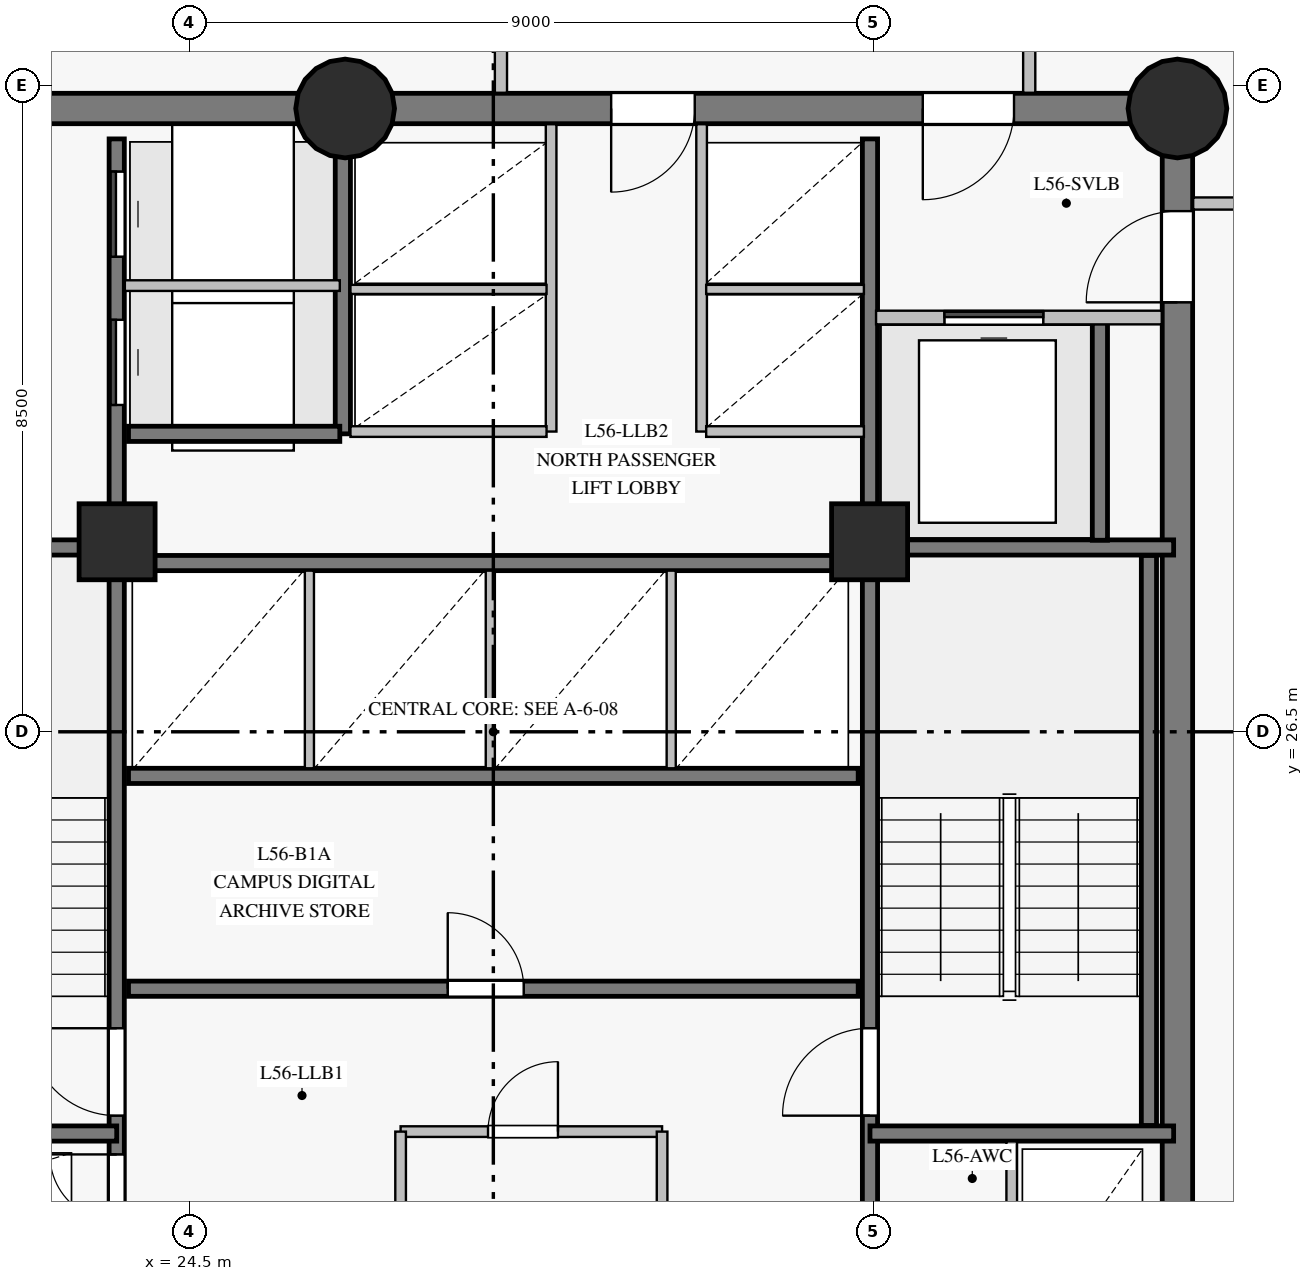
"""IFC4 building model, lengths in metres.
Left out: names, types, materials, properties, quantities, classifications, styles, units other than length and angle.
Written with IfcOpenShell. Run it as: python <this file> out.ifc"""

import sys

from ifc_helpers import new_model, si_unit, direction, frame, frame_2d, origin, origin_with_axes, origin_2d, place, context, subcontext, project, spatial, rectangle, circle, extrude, source, transform, mapped, element, fill, save


model = new_model("IFC4")
c1 = context("Model", 3, precision=1e-05, world=origin(), true_north=direction((0.0, 1.0)))
c2 = subcontext(c1, "Body", "Model", "MODEL_VIEW")
j1 = project(units=[si_unit("LENGTHUNIT", "METRE"), si_unit("PLANEANGLEUNIT", "RADIAN")], contexts=[c1])
p1 = place(None, origin())
s1 = spatial("IfcSite", under=j1, at=p1, CompositionType="ELEMENT")
p2 = place(p1, origin())
s2 = spatial("IfcBuilding", under=s1, at=p2, CompositionType="ELEMENT")
p3 = place(p2, frame((0.0, 0.0, 193.15)))
s3 = spatial("IfcBuildingStorey", under=s2, at=p3, CompositionType="ELEMENT", Elevation=193.15)
p4 = place(p3, frame((37.5, 18.3, 0.0), z_axis=(0.0, 0.0, 1.0), x_axis=(0.0, 1.0, 0.0)))
e1 = element("IfcWall", 1, at=p4, inside=s3, PredefinedType="SHEAR", context=c2, shape_type="SweptSolid", body=[
    extrude(rectangle(XDim=16.4, YDim=0.4, at=frame_2d((8.2, 0.0))), origin(), (0.0, 0.0, 1.0), 2.825),
])
p5 = place(p4, frame((13.85, 0.0, 0.0)))
e2 = element("IfcOpeningElement", 2, at=p5, cuts=e1, PredefinedType="OPENING", context=c2, shape_type="SweptSolid", body=[
    extrude(rectangle(XDim=1.2, YDim=2.15, at=frame_2d((0.6, 1.075))), frame((0.0, 0.21, 0.0), z_axis=(0.0, -1.0, 0.0), x_axis=(1.0, 0.0, 0.0)), (0.0, 0.0, 1.0), 0.42),
])
p6 = place(p3, frame((37.5, 34.7, 0.0), z_axis=(0.0, 0.0, 1.0), x_axis=(-1.0, 0.0, 0.0)))
e3 = element("IfcWall", 3, at=p6, inside=s3, PredefinedType="SHEAR", context=c2, shape_type="SweptSolid", body=[
    extrude(rectangle(XDim=10.95, YDim=0.4, at=frame_2d((5.475, 0.0))), origin(), (0.0, 0.0, 1.0), 2.825),
])
p7 = place(p6, frame((2.15, 0.0, 0.0)))
e4 = element("IfcOpeningElement", 4, at=p7, cuts=e3, PredefinedType="OPENING", context=c2, shape_type="SweptSolid", body=[
    extrude(rectangle(XDim=1.2, YDim=2.15, at=frame_2d((0.6, 1.075))), frame((0.0, 0.21, 0.0), z_axis=(0.0, -1.0, 0.0), x_axis=(1.0, 0.0, 0.0)), (0.0, 0.0, 1.0), 0.42),
])
p8 = place(p6, frame((6.35, 0.0, 0.0)))
e5 = element("IfcOpeningElement", 5, at=p8, cuts=e3, PredefinedType="OPENING", context=c2, shape_type="SweptSolid", body=[
    extrude(rectangle(XDim=1.1, YDim=2.15, at=frame_2d((0.55, 1.075))), frame((0.0, 0.21, 0.0), z_axis=(0.0, -1.0, 0.0), x_axis=(1.0, 0.0, 0.0)), (0.0, 0.0, 1.0), 0.42),
])
p9 = place(p3, frame((26.55, 34.7, 0.0), z_axis=(0.0, 0.0, 1.0), x_axis=(-1.0, 0.0, 0.0)))
e6 = element("IfcWall", 6, at=p9, inside=s3, PredefinedType="SHEAR", context=c2, shape_type="SweptSolid", body=[
    extrude(rectangle(XDim=7.05, YDim=0.4, at=frame_2d((3.525, 0.0))), origin(), (0.0, 0.0, 1.0), 2.825),
])
m1 = source(origin_with_axes(), c2, "Body", "SweptSolid", [
    extrude(circle(Radius=0.65, at=origin_2d()), origin(), (0.0, 0.0, 1.0), 3.05),
])
for number, where, z_axis, x_axis in (
    (7, (26.55, 34.7, 0.0), (0.0, 0.0, 1.0), (1.0, 0.0, 0.0)),
    (8, (37.5, 34.7, 0.0), (0.0, 0.0, 1.0), (1.0, 0.0, 0.0)),
):
    element("IfcColumn", number, at=place(p3, frame(where, z_axis=z_axis, x_axis=x_axis)), inside=s3, PredefinedType="COLUMN", context=c2, shape_type="MappedRepresentation", body=[
        mapped(m1, transform((0.0, 0.0, 0.0), scale=1.0)),
    ])
m2 = source(origin_with_axes(), c2, "Body", "SweptSolid", [
    extrude(rectangle(XDim=1.0, YDim=1.0, at=origin_2d()), origin(), (0.0, 0.0, 1.0), 3.05),
])
for number, where, z_axis, x_axis in (
    (9, (23.55, 29.0, 0.0), (0.0, 0.0, 1.0), (1.0, 0.0, 0.0)),
    (10, (33.45, 29.0, 0.0), (0.0, 0.0, 1.0), (1.0, 0.0, 0.0)),
):
    element("IfcColumn", number, at=place(p3, frame(where, z_axis=z_axis, x_axis=x_axis)), inside=s3, PredefinedType="COLUMN", context=c2, shape_type="MappedRepresentation", body=[
        mapped(m2, transform((0.0, 0.0, 0.0), scale=1.0)),
    ])
p10 = place(p3, frame((23.545, 18.7, 0.0), z_axis=(0.0, 0.0, 1.0), x_axis=(0.0, 1.0, 0.0)))
e11 = element("IfcWall", 11, at=p10, inside=s3, PredefinedType="SHEAR", context=c2, shape_type="SweptSolid", body=[
    extrude(rectangle(XDim=15.6, YDim=0.2, at=frame_2d((7.8, 0.0))), origin(), (0.0, 0.0, 1.0), 2.825),
])
p11 = place(p10, frame((2.75, 0.0, 0.0)))
e12 = element("IfcOpeningElement", 12, at=p11, cuts=e11, PredefinedType="OPENING", context=c2, shape_type="SweptSolid", body=[
    extrude(rectangle(XDim=1.15, YDim=2.15, at=frame_2d((0.575, 1.075))), frame((0.0, 0.11, 0.0), z_axis=(0.0, -1.0, 0.0), x_axis=(1.0, 0.0, 0.0)), (0.0, 0.0, 1.0), 0.22),
])
p12 = place(p10, frame((0.14, 0.0, 0.0)))
e13 = element("IfcOpeningElement", 13, at=p12, cuts=e11, PredefinedType="OPENING", context=c2, shape_type="SweptSolid", body=[
    extrude(rectangle(XDim=0.88, YDim=2.1, at=frame_2d((0.44, 1.05))), frame((0.0, 0.11, 0.0), z_axis=(0.0, -1.0, 0.0), x_axis=(1.0, 0.0, 0.0)), (0.0, 0.0, 1.0), 0.22),
])
p13 = place(p10, frame((1.36, 0.0, 0.0)))
e14 = element("IfcOpeningElement", 14, at=p13, cuts=e11, PredefinedType="OPENING", context=c2, shape_type="SweptSolid", body=[
    extrude(rectangle(XDim=0.88, YDim=2.1, at=frame_2d((0.44, 1.05))), frame((0.0, 0.11, 0.0), z_axis=(0.0, -1.0, 0.0), x_axis=(1.0, 0.0, 0.0)), (0.0, 0.0, 1.0), 0.22),
])
p14 = place(p10, frame((12.1, 0.0, 0.0)))
e15 = element("IfcOpeningElement", 15, at=p14, cuts=e11, PredefinedType="OPENING", context=c2, shape_type="SweptSolid", body=[
    extrude(rectangle(XDim=1.12, YDim=2.15, at=frame_2d((0.56, 1.075))), frame((0.0, 0.11, 0.0), z_axis=(0.0, -1.0, 0.0), x_axis=(1.0, 0.0, 0.0)), (0.0, 0.0, 1.0), 0.22),
])
p15 = place(p10, frame((14.05, 0.0, 0.0)))
e16 = element("IfcOpeningElement", 16, at=p15, cuts=e11, PredefinedType="OPENING", context=c2, shape_type="SweptSolid", body=[
    extrude(rectangle(XDim=1.12, YDim=2.15, at=frame_2d((0.56, 1.075))), frame((0.0, 0.11, 0.0), z_axis=(0.0, -1.0, 0.0), x_axis=(1.0, 0.0, 0.0)), (0.0, 0.0, 1.0), 0.22),
])
p16 = place(p3, frame((33.455, 18.7, 0.0), z_axis=(0.0, 0.0, 1.0), x_axis=(0.0, 1.0, 0.0)))
e17 = element("IfcWall", 17, at=p16, inside=s3, PredefinedType="SHEAR", context=c2, shape_type="SweptSolid", body=[
    extrude(rectangle(XDim=15.6, YDim=0.2, at=frame_2d((7.8, 0.0))), origin(), (0.0, 0.0, 1.0), 2.825),
])
p17 = place(p16, frame((2.75, 0.0, 0.0)))
e18 = element("IfcOpeningElement", 18, at=p17, cuts=e17, PredefinedType="OPENING", context=c2, shape_type="SweptSolid", body=[
    extrude(rectangle(XDim=1.15, YDim=2.15, at=frame_2d((0.575, 1.075))), frame((0.0, 0.11, 0.0), z_axis=(0.0, -1.0, 0.0), x_axis=(1.0, 0.0, 0.0)), (0.0, 0.0, 1.0), 0.22),
])
p18 = place(p16, frame((0.55, 0.0, 0.0)))
e19 = element("IfcOpeningElement", 19, at=p18, cuts=e17, PredefinedType="OPENING", context=c2, shape_type="SweptSolid", body=[
    extrude(rectangle(XDim=0.94, YDim=2.1, at=frame_2d((0.47, 1.05))), frame((0.0, 0.11, 0.0), z_axis=(0.0, -1.0, 0.0), x_axis=(1.0, 0.0, 0.0)), (0.0, 0.0, 1.0), 0.22),
])
p19 = place(p3, frame((23.7, 23.12, 0.0), z_axis=(0.0, 0.0, 1.0), x_axis=(1.0, 0.0, 0.0)))
e20 = element("IfcWall", 20, at=p19, inside=s3, PredefinedType="SHEAR", context=c2, shape_type="SweptSolid", body=[
    extrude(rectangle(XDim=9.6, YDim=0.2, at=frame_2d((4.8, 0.0))), origin(), (0.0, 0.0, 1.0), 2.825),
])
p20 = place(p19, frame((4.2, 0.0, 0.0)))
e21 = element("IfcOpeningElement", 21, at=p20, cuts=e20, PredefinedType="OPENING", context=c2, shape_type="SweptSolid", body=[
    extrude(rectangle(XDim=1.0, YDim=2.15, at=frame_2d((0.5, 1.075))), frame((0.0, 0.11, 0.0), z_axis=(0.0, -1.0, 0.0), x_axis=(1.0, 0.0, 0.0)), (0.0, 0.0, 1.0), 0.22),
])
for number, where, z_axis, x_axis in (
    (22, (23.7, 25.92, 0.0), (0.0, 0.0, 1.0), (1.0, 0.0, 0.0)),
    (23, (23.7, 28.72, 0.0), (0.0, 0.0, 1.0), (1.0, 0.0, 0.0)),
):
    element("IfcWall", number, at=place(p3, frame(where, z_axis=z_axis, x_axis=x_axis)), inside=s3, PredefinedType="SHEAR", context=c2, shape_type="SweptSolid", body=[
        extrude(rectangle(XDim=9.6, YDim=0.2, at=frame_2d((4.8, 0.0))), origin(), (0.0, 0.0, 1.0), 2.825),
    ])
p21 = place(p3, frame((37.125, 21.32, 0.0), z_axis=(0.0, 0.0, 1.0), x_axis=(0.0, 1.0, 0.0)))
e24 = element("IfcWall", 24, at=p21, inside=s3, PredefinedType="SHEAR", context=c2, shape_type="SweptSolid", body=[
    extrude(rectangle(XDim=7.5, YDim=0.2, at=frame_2d((3.75, 0.0))), origin(), (0.0, 0.0, 1.0), 2.825),
])
for number, where, z_axis, x_axis in (
    (25, (33.455, 21.215, 0.0), (0.0, 0.0, 1.0), (1.0, 0.0, 0.0)),
    (26, (33.455, 28.925, 0.0), (0.0, 0.0, 1.0), (1.0, 0.0, 0.0)),
    (27, (19.55, 21.215, 0.0), (0.0, 0.0, 1.0), (1.0, 0.0, 0.0)),
    (28, (19.55, 28.925, 0.0), (0.0, 0.0, 1.0), (1.0, 0.0, 0.0)),
):
    element("IfcWall", number, at=place(p3, frame(where, z_axis=z_axis, x_axis=x_axis)), inside=s3, PredefinedType="SHEAR", context=c2, shape_type="SweptSolid", body=[
        extrude(rectangle(XDim=3.995, YDim=0.2, at=frame_2d((1.998, 0.0))), origin(), (0.0, 0.0, 1.0), 2.825),
    ])
p22 = place(p3, frame((26.52, 30.42, 0.0), z_axis=(0.0, 0.0, 1.0), x_axis=(0.0, 1.0, 0.0)))
e29 = element("IfcWall", 29, at=p22, inside=s3, PredefinedType="SHEAR", context=c2, shape_type="SweptSolid", body=[
    extrude(rectangle(XDim=3.86, YDim=0.2, at=frame_2d((1.93, 0.0))), origin(), (0.0, 0.0, 1.0), 2.825),
])
p23 = place(p3, frame((36.48, 29.02, 0.0), z_axis=(0.0, 0.0, 1.0), x_axis=(0.0, 1.0, 0.0)))
e30 = element("IfcWall", 30, at=p23, inside=s3, PredefinedType="SHEAR", context=c2, shape_type="SweptSolid", body=[
    extrude(rectangle(XDim=2.86, YDim=0.2, at=frame_2d((1.43, 0.0))), origin(), (0.0, 0.0, 1.0), 2.825),
])
p24 = place(p3, frame((23.7, 30.42, 0.0), z_axis=(0.0, 0.0, 1.0), x_axis=(1.0, 0.0, 0.0)))
e31 = element("IfcWall", 31, at=p24, inside=s3, PredefinedType="SHEAR", context=c2, shape_type="SweptSolid", body=[
    extrude(rectangle(XDim=2.78, YDim=0.2, at=frame_2d((1.39, 0.0))), origin(), (0.0, 0.0, 1.0), 2.825),
])
p25 = place(p3, frame((37.707, 33.45, 0.0), z_axis=(0.0, 0.0, 1.0), x_axis=(1.0, 0.0, 0.0)))
e32 = element("IfcWall", 32, at=p25, inside=s3, PredefinedType="PARTITIONING", context=c2, shape_type="SweptSolid", body=[
    extrude(rectangle(XDim=4.093, YDim=0.16, at=frame_2d((2.046, 0.0))), origin(), (0.0, 0.0, 1.0), 2.825),
])
for number, where, z_axis, x_axis in (
    (33, (29.26, 30.45, 0.0), (0.0, 0.0, 1.0), (0.0, 1.0, 0.0)),
    (34, (31.24, 30.45, 0.0), (0.0, 0.0, 1.0), (0.0, 1.0, 0.0)),
):
    element("IfcWall", number, at=place(p3, frame(where, z_axis=z_axis, x_axis=x_axis)), inside=s3, PredefinedType="PARTITIONING", context=c2, shape_type="SweptSolid", body=[
        extrude(rectangle(XDim=4.043, YDim=0.14, at=frame_2d((2.021, 0.0))), origin(), (0.0, 0.0, 1.0), 2.825),
    ])
p26 = place(p3, frame((33.535, 31.95, 0.0), z_axis=(0.0, 0.0, 1.0), x_axis=(1.0, 0.0, 0.0)))
e35 = element("IfcWall", 35, at=p26, inside=s3, PredefinedType="PARTITIONING", context=c2, shape_type="SweptSolid", body=[
    extrude(rectangle(XDim=3.759, YDim=0.18, at=frame_2d((1.879, 0.0))), origin(), (0.0, 0.0, 1.0), 2.825),
])
p27 = place(p26, frame((0.9, 0.0, 0.0)))
e36 = element("IfcOpeningElement", 36, at=p27, cuts=e35, PredefinedType="OPENING", context=c2, shape_type="SweptSolid", body=[
    extrude(rectangle(XDim=1.3, YDim=2.2, at=frame_2d((0.65, 1.1))), frame((0.0, 0.1, 0.0), z_axis=(0.0, -1.0, 0.0), x_axis=(1.0, 0.0, 0.0)), (0.0, 0.0, 1.0), 0.2),
])
p28 = place(p3, frame((27.28, 21.24, 0.0), z_axis=(0.0, 0.0, 1.0), x_axis=(1.0, 0.0, 0.0)))
e37 = element("IfcWall", 37, at=p28, inside=s3, PredefinedType="PARTITIONING", context=c2, shape_type="SweptSolid", body=[
    extrude(rectangle(XDim=3.44, YDim=0.14, at=frame_2d((1.72, 0.0))), origin(), (0.0, 0.0, 1.0), 2.825),
])
p29 = place(p28, frame((1.15, 0.0, 0.0)))
e38 = element("IfcOpeningElement", 38, at=p29, cuts=e37, PredefinedType="OPENING", context=c2, shape_type="SweptSolid", body=[
    extrude(rectangle(XDim=0.92, YDim=2.1, at=frame_2d((0.46, 1.05))), frame((0.0, 0.08, 0.0), z_axis=(0.0, -1.0, 0.0), x_axis=(1.0, 0.0, 0.0)), (0.0, 0.0, 1.0), 0.16),
])
p30 = place(p3, frame((23.652, 32.37, 0.0), z_axis=(0.0, 0.0, 1.0), x_axis=(1.0, 0.0, 0.0)))
e39 = element("IfcWall", 39, at=p30, inside=s3, PredefinedType="PARTITIONING", context=c2, shape_type="SweptSolid", body=[
    extrude(rectangle(XDim=2.828, YDim=0.14, at=frame_2d((1.414, 0.0))), origin(), (0.0, 0.0, 1.0), 2.825),
])
for number, where, z_axis, x_axis in (
    (40, (27.28, 18.507, 0.0), (0.0, 0.0, 1.0), (0.0, 1.0, 0.0)),
    (41, (30.72, 18.507, 0.0), (0.0, 0.0, 1.0), (0.0, 1.0, 0.0)),
):
    element("IfcWall", number, at=place(p3, frame(where, z_axis=z_axis, x_axis=x_axis)), inside=s3, PredefinedType="PARTITIONING", context=c2, shape_type="SweptSolid", body=[
        extrude(rectangle(XDim=2.733, YDim=0.14, at=frame_2d((1.366, 0.0))), origin(), (0.0, 0.0, 1.0), 2.825),
    ])
for number, where, z_axis, x_axis in (
    (42, (26.08, 26.02, 0.0), (0.0, 0.0, 1.0), (0.0, 1.0, 0.0)),
    (43, (28.46, 26.02, 0.0), (0.0, 0.0, 1.0), (0.0, 1.0, 0.0)),
    (44, (30.84, 26.02, 0.0), (0.0, 0.0, 1.0), (0.0, 1.0, 0.0)),
):
    element("IfcWall", number, at=place(p3, frame(where, z_axis=z_axis, x_axis=x_axis)), inside=s3, PredefinedType="PARTITIONING", context=c2, shape_type="SweptSolid", body=[
        extrude(rectangle(XDim=2.6, YDim=0.12, at=frame_2d((1.3, 0.0))), origin(), (0.0, 0.0, 1.0), 2.825),
    ])
p31 = place(p3, frame((26.62, 30.45, 0.0), z_axis=(0.0, 0.0, 1.0), x_axis=(1.0, 0.0, 0.0)))
e45 = element("IfcWall", 45, at=p31, inside=s3, PredefinedType="PARTITIONING", context=c2, shape_type="SweptSolid", body=[
    extrude(rectangle(XDim=2.58, YDim=0.14, at=frame_2d((1.29, 0.0))), origin(), (0.0, 0.0, 1.0), 2.825),
])
p32 = place(p3, frame((26.62, 32.32, 0.0), z_axis=(0.0, 0.0, 1.0), x_axis=(1.0, 0.0, 0.0)))
e46 = element("IfcWall", 46, at=p32, inside=s3, PredefinedType="PARTITIONING", context=c2, shape_type="SweptSolid", body=[
    extrude(rectangle(XDim=2.58, YDim=0.12, at=frame_2d((1.29, 0.0))), origin(), (0.0, 0.0, 1.0), 2.825),
])
p33 = place(p3, frame((35.32, 18.507, 0.0), z_axis=(0.0, 0.0, 1.0), x_axis=(0.0, 1.0, 0.0)))
e47 = element("IfcWall", 47, at=p33, inside=s3, PredefinedType="PARTITIONING", context=c2, shape_type="SweptSolid", body=[
    extrude(rectangle(XDim=2.604, YDim=0.14, at=frame_2d((1.302, 0.0))), origin(), (0.0, 0.0, 1.0), 2.825),
])
p34 = place(p3, frame((31.3, 30.45, 0.0), z_axis=(0.0, 0.0, 1.0), x_axis=(1.0, 0.0, 0.0)))
e48 = element("IfcWall", 48, at=p34, inside=s3, PredefinedType="PARTITIONING", context=c2, shape_type="SweptSolid", body=[
    extrude(rectangle(XDim=2.075, YDim=0.14, at=frame_2d((1.038, 0.0))), origin(), (0.0, 0.0, 1.0), 2.825),
])
p35 = place(p3, frame((31.3, 32.32, 0.0), z_axis=(0.0, 0.0, 1.0), x_axis=(1.0, 0.0, 0.0)))
e49 = element("IfcWall", 49, at=p35, inside=s3, PredefinedType="PARTITIONING", context=c2, shape_type="SweptSolid", body=[
    extrude(rectangle(XDim=2.075, YDim=0.12, at=frame_2d((1.038, 0.0))), origin(), (0.0, 0.0, 1.0), 2.825),
])
for number, where, z_axis, x_axis in (
    (50, (28.6, 34.907, 0.0), (0.0, 0.0, 1.0), (0.0, 1.0, 0.0)),
    (51, (35.55, 36.4, 0.0), (0.0, 0.0, 1.0), (0.0, -1.0, 0.0)),
):
    element("IfcWall", number, at=place(p3, frame(where, z_axis=z_axis, x_axis=x_axis)), inside=s3, PredefinedType="PARTITIONING", context=c2, shape_type="SweptSolid", body=[
        extrude(rectangle(XDim=1.493, YDim=0.16, at=frame_2d((0.747, 0.0))), origin(), (0.0, 0.0, 1.0), 2.825),
    ])
m3 = source(origin_with_axes(), c2, "Body", "SweptSolid", [
    extrude(rectangle(XDim=1.15, YDim=2.15, at=frame_2d((0.575, 1.075))), frame((0.0, 0.025, 0.0), z_axis=(0.0, -1.0, 0.0), x_axis=(1.0, 0.0, 0.0)), (0.0, 0.0, 1.0), 0.05),
])
p36 = place(p11, origin())
e52 = element("IfcDoor", 52, at=p36, inside=s3, OperationType="SINGLE_SWING_RIGHT", PredefinedType="DOOR", context=c2, shape_type="MappedRepresentation", body=[
    mapped(m3, transform((0.0, 0.0, 0.0), scale=1.0)),
])
fill(e12, e52)
p37 = place(p17, origin())
e53 = element("IfcDoor", 53, at=p37, inside=s3, OperationType="SINGLE_SWING_LEFT", PredefinedType="DOOR", context=c2, shape_type="MappedRepresentation", body=[
    mapped(m3, transform((0.0, 0.0, 0.0), scale=1.0)),
])
fill(e18, e53)
m4 = source(origin_with_axes(), c2, "Body", "SweptSolid", [
    extrude(rectangle(XDim=1.2, YDim=2.15, at=frame_2d((0.6, 1.075))), frame((0.0, 0.025, 0.0), z_axis=(0.0, -1.0, 0.0), x_axis=(1.0, 0.0, 0.0)), (0.0, 0.0, 1.0), 0.05),
])
p38 = place(p5, origin())
e54 = element("IfcDoor", 54, at=p38, inside=s3, OperationType="SINGLE_SWING_LEFT", PredefinedType="DOOR", context=c2, shape_type="MappedRepresentation", body=[
    mapped(m4, transform((0.0, 0.0, 0.0), scale=1.0)),
])
fill(e2, e54)
p39 = place(p7, origin())
e55 = element("IfcDoor", 55, at=p39, inside=s3, OperationType="SINGLE_SWING_RIGHT", PredefinedType="DOOR", context=c2, shape_type="MappedRepresentation", body=[
    mapped(m4, transform((0.0, 0.0, 0.0), scale=1.0)),
])
fill(e4, e55)
m5 = source(origin_with_axes(), c2, "Body", "SweptSolid", [
    extrude(rectangle(XDim=1.3, YDim=2.2, at=frame_2d((0.65, 1.1))), frame((0.0, 0.025, 0.0), z_axis=(0.0, -1.0, 0.0), x_axis=(1.0, 0.0, 0.0)), (0.0, 0.0, 1.0), 0.05),
])
p40 = place(p27, origin())
e56 = element("IfcDoor", 56, at=p40, inside=s3, OperationType="SLIDING_TO_LEFT", PredefinedType="DOOR", context=c2, shape_type="MappedRepresentation", body=[
    mapped(m5, transform((0.0, 0.0, 0.0), scale=1.0)),
])
fill(e36, e56)
m6 = source(origin_with_axes(), c2, "Body", "SweptSolid", [
    extrude(rectangle(XDim=0.88, YDim=2.1, at=frame_2d((0.44, 1.05))), frame((0.0, 0.025, 0.0), z_axis=(0.0, -1.0, 0.0), x_axis=(1.0, 0.0, 0.0)), (0.0, 0.0, 1.0), 0.05),
])
p41 = place(p13, origin())
e57 = element("IfcDoor", 57, at=p41, inside=s3, OperationType="SINGLE_SWING_RIGHT", PredefinedType="DOOR", context=c2, shape_type="MappedRepresentation", body=[
    mapped(m6, transform((0.0, 0.0, 0.0), scale=1.0)),
])
fill(e14, e57)
m7 = source(origin_with_axes(), c2, "Body", "SweptSolid", [
    extrude(rectangle(XDim=0.92, YDim=2.1, at=frame_2d((0.46, 1.05))), frame((0.0, 0.025, 0.0), z_axis=(0.0, -1.0, 0.0), x_axis=(1.0, 0.0, 0.0)), (0.0, 0.0, 1.0), 0.05),
])
p42 = place(p29, origin())
e58 = element("IfcDoor", 58, at=p42, inside=s3, OperationType="SINGLE_SWING_RIGHT", PredefinedType="DOOR", context=c2, shape_type="MappedRepresentation", body=[
    mapped(m7, transform((0.0, 0.0, 0.0), scale=1.0)),
])
fill(e38, e58)
m8 = source(origin_with_axes(), c2, "Body", "SweptSolid", [
    extrude(rectangle(XDim=1.0, YDim=2.15, at=frame_2d((0.5, 1.075))), frame((0.0, 0.025, 0.0), z_axis=(0.0, -1.0, 0.0), x_axis=(1.0, 0.0, 0.0)), (0.0, 0.0, 1.0), 0.05),
])
p43 = place(p20, origin())
e59 = element("IfcDoor", 59, at=p43, inside=s3, OperationType="SINGLE_SWING_LEFT", PredefinedType="DOOR", context=c2, shape_type="MappedRepresentation", body=[
    mapped(m8, transform((0.0, 0.0, 0.0), scale=1.0)),
])
fill(e21, e59)
m9 = source(origin_with_axes(), c2, "Body", "SweptSolid", [
    extrude(rectangle(XDim=1.1, YDim=2.15, at=frame_2d((0.55, 1.075))), frame((0.0, 0.025, 0.0), z_axis=(0.0, -1.0, 0.0), x_axis=(1.0, 0.0, 0.0)), (0.0, 0.0, 1.0), 0.05),
])
p44 = place(p8, origin())
e60 = element("IfcDoor", 60, at=p44, inside=s3, OperationType="SINGLE_SWING_RIGHT", PredefinedType="DOOR", context=c2, shape_type="MappedRepresentation", body=[
    mapped(m9, transform((0.0, 0.0, 0.0), scale=1.0)),
])
fill(e5, e60)
m10 = source(origin_with_axes(), c2, "Body", "SweptSolid", [
    extrude(rectangle(XDim=1.12, YDim=2.15, at=frame_2d((0.56, 1.075))), frame((0.0, 0.025, 0.0), z_axis=(0.0, -1.0, 0.0), x_axis=(1.0, 0.0, 0.0)), (0.0, 0.0, 1.0), 0.05),
])
p45 = place(p14, origin())
e61 = element("IfcDoor", 61, at=p45, inside=s3, OperationType="SLIDING_TO_LEFT", PredefinedType="DOOR", context=c2, shape_type="MappedRepresentation", body=[
    mapped(m10, transform((0.0, 0.0, 0.0), scale=1.0)),
])
fill(e15, e61)
p46 = place(p15, origin())
e62 = element("IfcDoor", 62, at=p46, inside=s3, OperationType="SLIDING_TO_RIGHT", PredefinedType="DOOR", context=c2, shape_type="MappedRepresentation", body=[
    mapped(m10, transform((0.0, 0.0, 0.0), scale=1.0)),
])
fill(e16, e62)
save(model, sys.argv[1])
